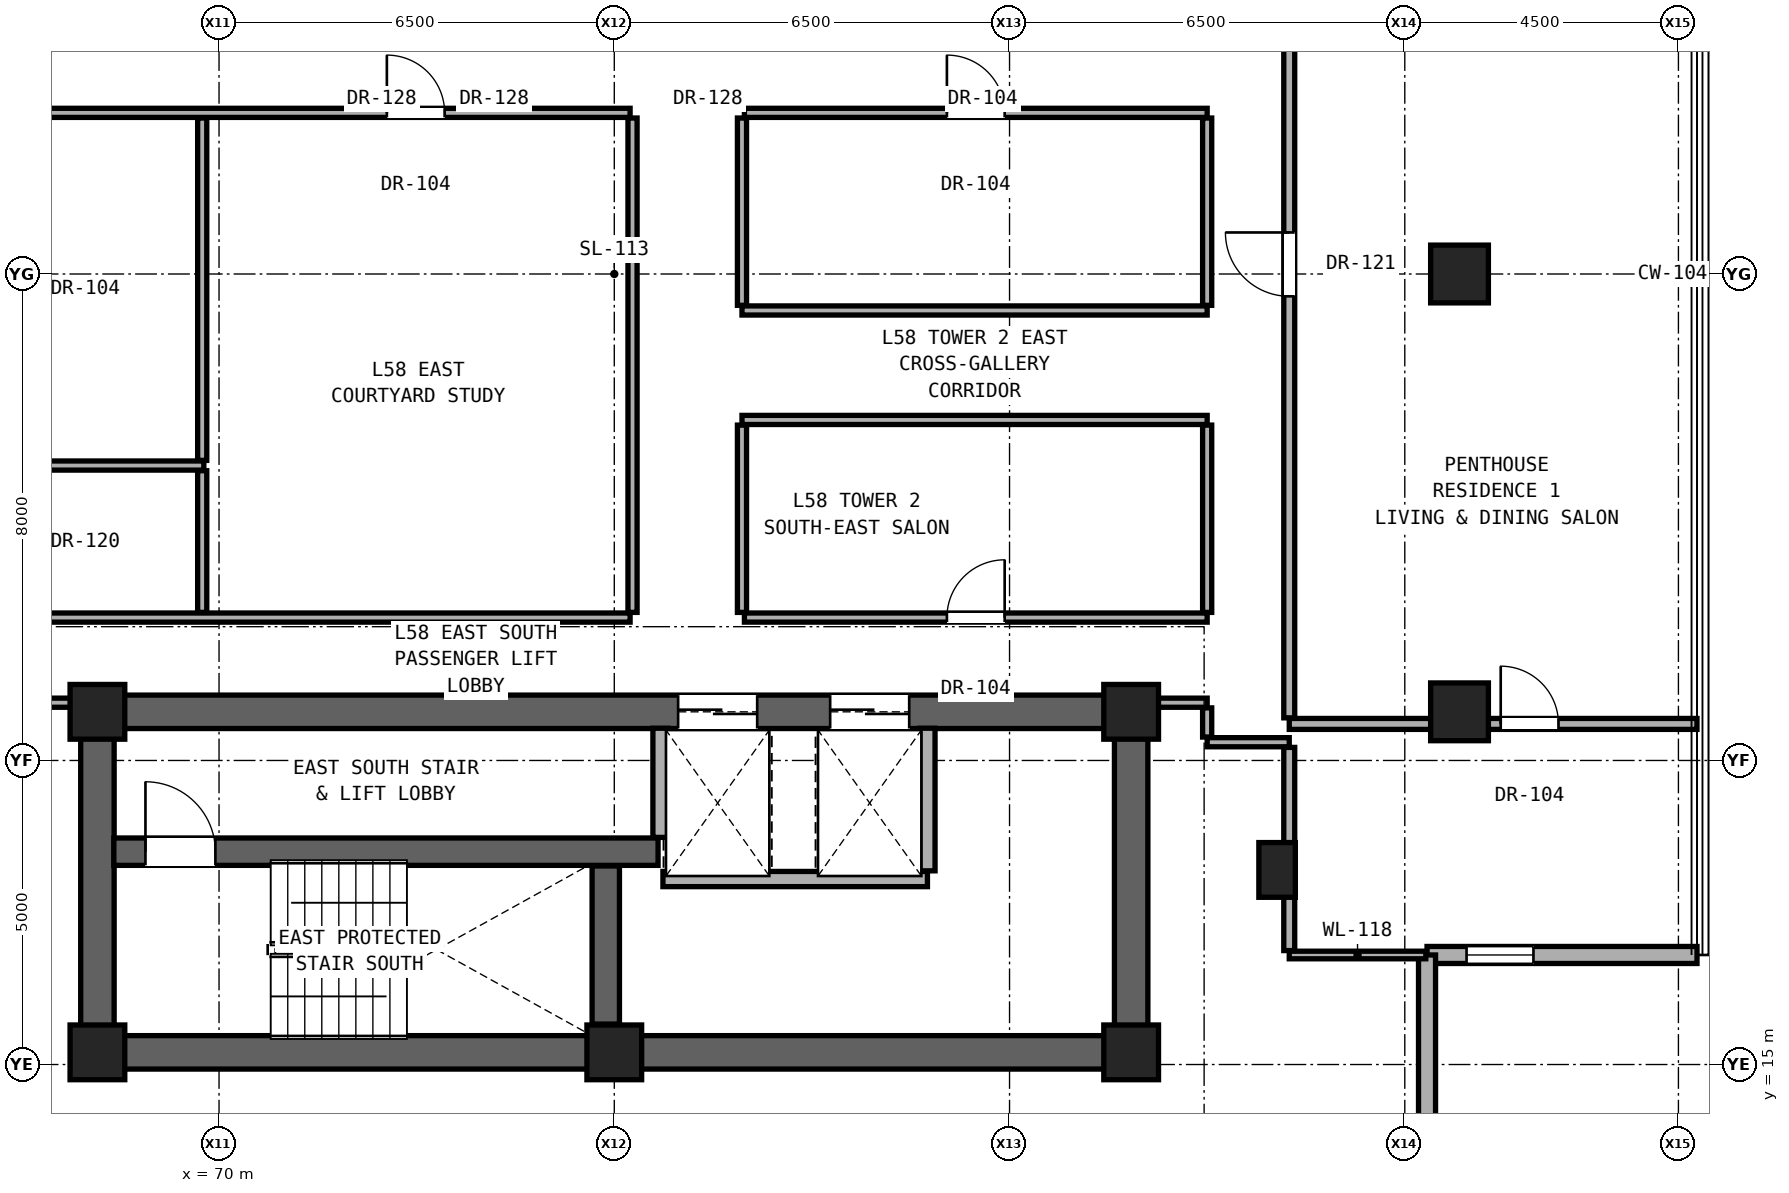
"""IFC4 building model, lengths in metres.
Left out: names, types, materials, properties, quantities, classifications, styles, units other than length and angle.
Written with IfcOpenShell. Run it as: python <this file> out.ifc"""

import sys

from ifc_helpers import new_model, si_unit, direction, frame, frame_2d, origin, origin_2d, place, context, subcontext, project, spatial, rectangle, hollow_rectangle, extrude, element, fill, save


model = new_model("IFC4")
c1 = context("Model", 3, precision=1e-05, world=origin(), true_north=direction((0.0, 1.0)))
c2 = subcontext(c1, "Body", "Model", "MODEL_VIEW")
j1 = project(units=[si_unit("LENGTHUNIT", "METRE"), si_unit("PLANEANGLEUNIT", "RADIAN")], contexts=[c1])
p1 = place(None, origin())
s1 = spatial("IfcSite", under=j1, at=p1, CompositionType="ELEMENT")
p2 = place(p1, origin())
s2 = spatial("IfcBuilding", under=s1, at=p2, CompositionType="ELEMENT")
p3 = place(p2, frame((0.0, 0.0, 203.15)))
s3 = spatial("IfcBuildingStorey", under=s2, at=p3, CompositionType="ELEMENT", Elevation=203.15)
for number, where, z_axis, x_axis in (
    (1, (68.0, 15.2, 0.0), (0.0, 0.0, 1.0), (1.0, 0.0, 0.0)),
    (2, (76.5, 15.2, 0.0), (0.0, 0.0, 1.0), (1.0, 0.0, 0.0)),
    (3, (85.0, 15.2, 0.0), (0.0, 0.0, 1.0), (1.0, 0.0, 0.0)),
    (4, (68.0, 20.8, 0.0), (0.0, 0.0, 1.0), (1.0, 0.0, 0.0)),
    (5, (85.0, 20.8, 0.0), (0.0, 0.0, 1.0), (1.0, 0.0, 0.0)),
):
    element("IfcColumn", number, at=place(p3, frame(where, z_axis=z_axis, x_axis=x_axis)), inside=s3, PredefinedType="COLUMN", context=c2, shape_type="SweptSolid", body=[
        extrude(rectangle(XDim=0.9, YDim=0.9, at=origin_2d()), origin(), (0.0, 0.0, 1.0), 3.25),
    ])
for number, where, z_axis, x_axis in (
    (6, (90.4, 20.8, 0.0), (0.0, 0.0, 1.0), (1.0, 0.0, 0.0)),
    (7, (90.4, 28.0, 0.0), (0.0, 0.0, 1.0), (1.0, 0.0, 0.0)),
):
    element("IfcColumn", number, at=place(p3, frame(where, z_axis=z_axis, x_axis=x_axis)), inside=s3, PredefinedType="COLUMN", context=c2, shape_type="SweptSolid", body=[
        extrude(hollow_rectangle(XDim=0.95, YDim=0.95, WallThickness=0.05, at=origin_2d()), origin(), (0.0, 0.0, 1.0), 3.25),
    ])
p4 = place(p3, frame((87.4, 18.2, 0.0), z_axis=(0.0, 0.0, 1.0), x_axis=(1.0, 0.0, 0.0)))
e8 = element("IfcColumn", 8, at=p4, inside=s3, PredefinedType="PILASTER", context=c2, shape_type="SweptSolid", body=[
    extrude(rectangle(XDim=0.6, YDim=0.9, at=origin_2d()), origin(), (0.0, 0.0, 1.0), 3.25),
])
p5 = place(p3, frame((68.0, 15.2, 0.0), z_axis=(0.0, 0.0, 1.0), x_axis=(1.0, 0.0, 0.0)))
e9 = element("IfcWall", 9, at=p5, inside=s3, PredefinedType="SHEAR", context=c2, shape_type="SweptSolid", body=[
    extrude(rectangle(XDim=17.0, YDim=0.55, at=frame_2d((8.5, 0.0))), origin(), (0.0, 0.0, 1.0), 3.05),
])
for number, where, z_axis, x_axis in (
    (10, (68.0, 15.2, 0.0), (0.0, 0.0, 1.0), (0.0, 1.0, 0.0)),
    (11, (85.0, 15.2, 0.0), (0.0, 0.0, 1.0), (0.0, 1.0, 0.0)),
):
    element("IfcWall", number, at=place(p3, frame(where, z_axis=z_axis, x_axis=x_axis)), inside=s3, PredefinedType="SHEAR", context=c2, shape_type="SweptSolid", body=[
        extrude(rectangle(XDim=5.6, YDim=0.55, at=frame_2d((2.8, 0.0))), origin(), (0.0, 0.0, 1.0), 3.05),
    ])
p6 = place(p3, frame((68.0, 20.8, 0.0), z_axis=(0.0, 0.0, 1.0), x_axis=(1.0, 0.0, 0.0)))
e12 = element("IfcWall", 12, at=p6, inside=s3, PredefinedType="SHEAR", context=c2, shape_type="SweptSolid", body=[
    extrude(rectangle(XDim=17.0, YDim=0.55, at=frame_2d((8.5, 0.0))), origin(), (0.0, 0.0, 1.0), 3.05),
])
p7 = place(p6, frame((9.55, 0.0, 0.0)))
e13 = element("IfcOpeningElement", 13, at=p7, cuts=e12, PredefinedType="OPENING", context=c2, shape_type="SweptSolid", body=[
    extrude(rectangle(XDim=1.3, YDim=2.3, at=frame_2d((0.65, 1.15))), frame((0.0, 0.285, 0.0), z_axis=(0.0, -1.0, 0.0), x_axis=(1.0, 0.0, 0.0)), (0.0, 0.0, 1.0), 0.57),
])
p8 = place(p6, frame((12.05, 0.0, 0.0)))
e14 = element("IfcOpeningElement", 14, at=p8, cuts=e12, PredefinedType="OPENING", context=c2, shape_type="SweptSolid", body=[
    extrude(rectangle(XDim=1.3, YDim=2.3, at=frame_2d((0.65, 1.15))), frame((0.0, 0.285, 0.0), z_axis=(0.0, -1.0, 0.0), x_axis=(1.0, 0.0, 0.0)), (0.0, 0.0, 1.0), 0.57),
])
p9 = place(p3, frame((89.866, 16.802, 0.0), z_axis=(0.0, 0.0, 1.0), x_axis=(1.0, 0.0, 0.0)))
e15 = element("IfcWall", 15, at=p9, inside=s3, PredefinedType="SOLIDWALL", context=c2, shape_type="SweptSolid", body=[
    extrude(rectangle(XDim=4.44, YDim=0.28, at=frame_2d((2.22, 0.0))), origin(), (0.0, 0.0, 1.0), 3.03),
])
p10 = place(p9, frame((0.65, 0.0, 0.85)))
e16 = element("IfcOpeningElement", 16, at=p10, cuts=e15, PredefinedType="OPENING", context=c2, shape_type="SweptSolid", body=[
    extrude(rectangle(XDim=1.1, YDim=2.0, at=frame_2d((0.55, 1.0))), frame((0.0, 0.15, 0.0), z_axis=(0.0, -1.0, 0.0), x_axis=(1.0, 0.0, 0.0)), (0.0, 0.0, 1.0), 0.3),
])
p11 = place(p3, frame((89.866, 12.362, 0.0), z_axis=(0.0, 0.0, 1.0), x_axis=(0.0, 1.0, 0.0)))
e17 = element("IfcWall", 17, at=p11, inside=s3, PredefinedType="SOLIDWALL", context=c2, shape_type="SweptSolid", body=[
    extrude(rectangle(XDim=4.44, YDim=0.28, at=frame_2d((2.22, 0.0))), origin(), (0.0, 0.0, 1.0), 3.03),
])
p12 = place(p3, frame((87.6, 16.801, 0.0), z_axis=(0.0, 0.0, 1.0), x_axis=(1.0, 0.0, 0.0)))
e18 = element("IfcWall", 18, at=p12, inside=s3, PredefinedType="PARTITIONING", context=c2, shape_type="SweptSolid", body=[
    extrude(rectangle(XDim=2.246, YDim=0.125, at=frame_2d((1.123, 0.0))), origin(), (0.0, 0.0, 1.0), 3.05),
])
p13 = place(p3, frame((77.3, 18.05, 0.0), z_axis=(0.0, 0.0, 1.0), x_axis=(1.0, 0.0, 0.0)))
e19 = element("IfcWall", 19, at=p13, inside=s3, PredefinedType="SOLIDWALL", context=c2, shape_type="SweptSolid", body=[
    extrude(rectangle(XDim=4.35, YDim=0.25, at=frame_2d((2.175, 0.0))), origin(), (0.0, 0.0, 1.0), 3.05),
])
p14 = place(p3, frame((68.27, 18.5, 0.0), z_axis=(0.0, 0.0, 1.0), x_axis=(1.0, 0.0, 0.0)))
e20 = element("IfcWall", 20, at=p14, inside=s3, PredefinedType="SHEAR", context=c2, shape_type="SweptSolid", body=[
    extrude(rectangle(XDim=8.95, YDim=0.45, at=frame_2d((4.475, 0.0))), origin(), (0.0, 0.0, 1.0), 3.05),
])
p15 = place(p14, frame((0.52, 0.0, 0.0)))
e21 = element("IfcOpeningElement", 21, at=p15, cuts=e20, PredefinedType="OPENING", context=c2, shape_type="SweptSolid", body=[
    extrude(rectangle(XDim=1.15, YDim=2.2, at=frame_2d((0.575, 1.1))), frame((0.0, 0.235, 0.0), z_axis=(0.0, -1.0, 0.0), x_axis=(1.0, 0.0, 0.0)), (0.0, 0.0, 1.0), 0.47),
])
p16 = place(p3, frame((86.25, 20.3, 0.0), z_axis=(0.0, 0.0, 1.0), x_axis=(1.0, 0.0, 0.0)))
e22 = element("IfcWall", 22, at=p16, inside=s3, PredefinedType="PARTITIONING", context=c2, shape_type="SweptSolid", body=[
    extrude(rectangle(XDim=1.35, YDim=0.15, at=frame_2d((0.675, 0.0))), origin(), (0.0, 0.0, 1.0), 3.05),
])
p17 = place(p3, frame((87.6, 20.601, 0.0), z_axis=(0.0, 0.0, 1.0), x_axis=(1.0, 0.0, 0.0)))
e23 = element("IfcWall", 23, at=p17, inside=s3, PredefinedType="PARTITIONING", context=c2, shape_type="SweptSolid", body=[
    extrude(rectangle(XDim=6.705, YDim=0.18, at=frame_2d((3.353, 0.0))), origin(), (0.0, 0.0, 1.0), 2.442),
])
p18 = place(p17, frame((3.478, 0.0, 0.0)))
e24 = element("IfcOpeningElement", 24, at=p18, cuts=e23, PredefinedType="OPENING", context=c2, shape_type="SweptSolid", body=[
    extrude(rectangle(XDim=0.95, YDim=2.15, at=frame_2d((0.475, 1.075))), frame((0.0, 0.1, 0.0), z_axis=(0.0, -1.0, 0.0), x_axis=(1.0, 0.0, 0.0)), (0.0, 0.0, 1.0), 0.2),
])
p19 = place(p3, frame((66.62, 20.95, 0.0), z_axis=(0.0, 0.0, 1.0), x_axis=(1.0, 0.0, 0.0)))
e25 = element("IfcWall", 25, at=p19, inside=s3, PredefinedType="PARTITIONING", context=c2, shape_type="SweptSolid", body=[
    extrude(rectangle(XDim=1.11, YDim=0.15, at=frame_2d((0.555, 0.0))), origin(), (0.0, 0.0, 1.0), 2.442),
])
p20 = place(p3, frame((85.27, 20.95, 0.0), z_axis=(0.0, 0.0, 1.0), x_axis=(1.0, 0.0, 0.0)))
e26 = element("IfcWall", 26, at=p20, inside=s3, PredefinedType="PARTITIONING", context=c2, shape_type="SweptSolid", body=[
    extrude(rectangle(XDim=0.98, YDim=0.15, at=frame_2d((0.49, 0.0))), origin(), (0.0, 0.0, 1.0), 2.442),
])
p21 = place(p3, frame((66.62, 22.35, 0.0), z_axis=(0.0, 0.0, 1.0), x_axis=(1.0, 0.0, 0.0)))
e27 = element("IfcWall", 27, at=p21, inside=s3, PredefinedType="PARTITIONING", context=c2, shape_type="SweptSolid", body=[
    extrude(rectangle(XDim=10.14, YDim=0.15, at=frame_2d((5.07, 0.0))), origin(), (0.0, 0.0, 1.0), 2.186),
])
p22 = place(p3, frame((78.64, 22.35, 0.0), z_axis=(0.0, 0.0, 1.0), x_axis=(1.0, 0.0, 0.0)))
e28 = element("IfcWall", 28, at=p22, inside=s3, PredefinedType="PARTITIONING", context=c2, shape_type="SweptSolid", body=[
    extrude(rectangle(XDim=7.61, YDim=0.15, at=frame_2d((3.805, 0.0))), origin(), (0.0, 0.0, 1.0), 2.186),
])
p23 = place(p22, frame((3.33, 0.0, 0.0)))
e29 = element("IfcOpeningElement", 29, at=p23, cuts=e28, PredefinedType="OPENING", context=c2, shape_type="SweptSolid", body=[
    extrude(rectangle(XDim=0.95, YDim=2.15, at=frame_2d((0.475, 1.075))), frame((0.0, 0.085, 0.0), z_axis=(0.0, -1.0, 0.0), x_axis=(1.0, 0.0, 0.0)), (0.0, 0.0, 1.0), 0.17),
])
p24 = place(p3, frame((66.62, 24.85, 0.0), z_axis=(0.0, 0.0, 1.0), x_axis=(1.0, 0.0, 0.0)))
e30 = element("IfcWall", 30, at=p24, inside=s3, PredefinedType="PARTITIONING", context=c2, shape_type="SweptSolid", body=[
    extrude(rectangle(XDim=3.13, YDim=0.15, at=frame_2d((1.565, 0.0))), origin(), (0.0, 0.0, 1.0), 2.186),
])
for number, where, z_axis, x_axis in (
    (31, (78.6, 25.6, 0.0), (0.0, 0.0, 1.0), (1.0, 0.0, 0.0)),
    (32, (78.6, 27.4, 0.0), (0.0, 0.0, 1.0), (1.0, 0.0, 0.0)),
):
    element("IfcWall", number, at=place(p3, frame(where, z_axis=z_axis, x_axis=x_axis)), inside=s3, PredefinedType="PARTITIONING", context=c2, shape_type="SweptSolid", body=[
        extrude(rectangle(XDim=7.65, YDim=0.15, at=frame_2d((3.825, 0.0))), origin(), (0.0, 0.0, 1.0), 2.186),
    ])
p25 = place(p3, frame((66.62, 30.65, 0.0), z_axis=(0.0, 0.0, 1.0), x_axis=(1.0, 0.0, 0.0)))
e33 = element("IfcWall", 33, at=p25, inside=s3, PredefinedType="PARTITIONING", context=c2, shape_type="SweptSolid", body=[
    extrude(rectangle(XDim=10.14, YDim=0.15, at=frame_2d((5.07, 0.0))), origin(), (0.0, 0.0, 1.0), 2.186),
])
p26 = place(p25, frame((6.14, 0.0, 0.0)))
e34 = element("IfcOpeningElement", 34, at=p26, cuts=e33, PredefinedType="OPENING", context=c2, shape_type="SweptSolid", body=[
    extrude(rectangle(XDim=0.95, YDim=2.15, at=frame_2d((0.475, 1.075))), frame((0.0, 0.085, 0.0), z_axis=(0.0, -1.0, 0.0), x_axis=(1.0, 0.0, 0.0)), (0.0, 0.0, 1.0), 0.17),
])
p27 = place(p3, frame((78.64, 30.65, 0.0), z_axis=(0.0, 0.0, 1.0), x_axis=(1.0, 0.0, 0.0)))
e35 = element("IfcWall", 35, at=p27, inside=s3, PredefinedType="PARTITIONING", context=c2, shape_type="SweptSolid", body=[
    extrude(rectangle(XDim=7.61, YDim=0.15, at=frame_2d((3.805, 0.0))), origin(), (0.0, 0.0, 1.0), 2.186),
])
p28 = place(p27, frame((3.33, 0.0, 0.0)))
e36 = element("IfcOpeningElement", 36, at=p28, cuts=e35, PredefinedType="OPENING", context=c2, shape_type="SweptSolid", body=[
    extrude(rectangle(XDim=0.95, YDim=2.15, at=frame_2d((0.475, 1.075))), frame((0.0, 0.085, 0.0), z_axis=(0.0, -1.0, 0.0), x_axis=(1.0, 0.0, 0.0)), (0.0, 0.0, 1.0), 0.17),
])
p29 = place(p3, frame((69.723, 22.435, 0.0), z_axis=(0.0, 0.0, 1.0), x_axis=(0.0, 1.0, 0.0)))
e37 = element("IfcWall", 37, at=p29, inside=s3, PredefinedType="PARTITIONING", context=c2, shape_type="SweptSolid", body=[
    extrude(rectangle(XDim=2.33, YDim=0.15, at=frame_2d((1.165, 0.0))), origin(), (0.0, 0.0, 1.0), 3.05),
])
p30 = place(p3, frame((69.723, 24.935, 0.0), z_axis=(0.0, 0.0, 1.0), x_axis=(0.0, 1.0, 0.0)))
e38 = element("IfcWall", 38, at=p30, inside=s3, PredefinedType="PARTITIONING", context=c2, shape_type="SweptSolid", body=[
    extrude(rectangle(XDim=5.63, YDim=0.15, at=frame_2d((2.815, 0.0))), origin(), (0.0, 0.0, 1.0), 2.186),
])
p31 = place(p3, frame((76.36, 15.665, 0.0), z_axis=(0.0, 0.0, 1.0), x_axis=(0.0, 1.0, 0.0)))
e39 = element("IfcWall", 39, at=p31, inside=s3, PredefinedType="SHEAR", context=c2, shape_type="SweptSolid", body=[
    extrude(rectangle(XDim=2.6, YDim=0.45, at=frame_2d((1.3, 0.0))), origin(), (0.0, 0.0, 1.0), 3.05),
])
p32 = place(p3, frame((76.8, 22.435, 0.0), z_axis=(0.0, 0.0, 1.0), x_axis=(0.0, 1.0, 0.0)))
e40 = element("IfcWall", 40, at=p32, inside=s3, PredefinedType="PARTITIONING", context=c2, shape_type="SweptSolid", body=[
    extrude(rectangle(XDim=8.13, YDim=0.15, at=frame_2d((4.065, 0.0))), origin(), (0.0, 0.0, 1.0), 2.186),
])
p33 = place(p3, frame((77.26, 18.735, 0.0), z_axis=(0.0, 0.0, 1.0), x_axis=(0.0, 1.0, 0.0)))
e41 = element("IfcWall", 41, at=p33, inside=s3, PredefinedType="SOLIDWALL", context=c2, shape_type="SweptSolid", body=[
    extrude(rectangle(XDim=1.795, YDim=0.25, at=frame_2d((0.897, 0.0))), origin(), (0.0, 0.0, 1.0), 3.05),
])
p34 = place(p3, frame((78.6, 22.435, 0.0), z_axis=(0.0, 0.0, 1.0), x_axis=(0.0, 1.0, 0.0)))
e42 = element("IfcWall", 42, at=p34, inside=s3, PredefinedType="PARTITIONING", context=c2, shape_type="SweptSolid", body=[
    extrude(rectangle(XDim=3.08, YDim=0.15, at=frame_2d((1.54, 0.0))), origin(), (0.0, 0.0, 1.0), 3.05),
])
p35 = place(p3, frame((78.6, 27.485, 0.0), z_axis=(0.0, 0.0, 1.0), x_axis=(0.0, 1.0, 0.0)))
e43 = element("IfcWall", 43, at=p35, inside=s3, PredefinedType="PARTITIONING", context=c2, shape_type="SweptSolid", body=[
    extrude(rectangle(XDim=3.08, YDim=0.15, at=frame_2d((1.54, 0.0))), origin(), (0.0, 0.0, 1.0), 2.186),
])
p36 = place(p3, frame((81.65, 18.185, 0.0), z_axis=(0.0, 0.0, 1.0), x_axis=(0.0, 1.0, 0.0)))
e44 = element("IfcWall", 44, at=p36, inside=s3, PredefinedType="SOLIDWALL", context=c2, shape_type="SweptSolid", body=[
    extrude(rectangle(XDim=2.345, YDim=0.25, at=frame_2d((1.172, 0.0))), origin(), (0.0, 0.0, 1.0), 3.05),
])
p37 = place(p3, frame((86.25, 20.385, 0.0), z_axis=(0.0, 0.0, 1.0), x_axis=(0.0, 1.0, 0.0)))
e45 = element("IfcWall", 45, at=p37, inside=s3, PredefinedType="PARTITIONING", context=c2, shape_type="SweptSolid", body=[
    extrude(rectangle(XDim=0.48, YDim=0.15, at=frame_2d((0.24, 0.0))), origin(), (0.0, 0.0, 1.0), 2.442),
])
p38 = place(p3, frame((86.25, 22.435, 0.0), z_axis=(0.0, 0.0, 1.0), x_axis=(0.0, 1.0, 0.0)))
e46 = element("IfcWall", 46, at=p38, inside=s3, PredefinedType="PARTITIONING", context=c2, shape_type="SweptSolid", body=[
    extrude(rectangle(XDim=3.08, YDim=0.15, at=frame_2d((1.54, 0.0))), origin(), (0.0, 0.0, 1.0), 3.05),
])
p39 = place(p3, frame((86.25, 27.485, 0.0), z_axis=(0.0, 0.0, 1.0), x_axis=(0.0, 1.0, 0.0)))
e47 = element("IfcWall", 47, at=p39, inside=s3, PredefinedType="PARTITIONING", context=c2, shape_type="SweptSolid", body=[
    extrude(rectangle(XDim=3.08, YDim=0.15, at=frame_2d((1.54, 0.0))), origin(), (0.0, 0.0, 1.0), 2.346),
])
p40 = place(p3, frame((87.6, 16.874, 0.0), z_axis=(0.0, 0.0, 1.0), x_axis=(0.0, 1.0, 0.0)))
e48 = element("IfcWall", 48, at=p40, inside=s3, PredefinedType="PARTITIONING", context=c2, shape_type="SweptSolid", body=[
    extrude(rectangle(XDim=3.342, YDim=0.18, at=frame_2d((1.671, 0.0))), origin(), (0.0, 0.0, 1.0), 2.493),
])
p41 = place(p3, frame((87.6, 20.701, 0.0), z_axis=(0.0, 0.0, 1.0), x_axis=(0.0, 1.0, 0.0)))
e49 = element("IfcWall", 49, at=p41, inside=s3, PredefinedType="PARTITIONING", context=c2, shape_type="SweptSolid", body=[
    extrude(rectangle(XDim=14.914, YDim=0.18, at=frame_2d((7.457, 0.0))), origin(), (0.0, 0.0, 1.0), 2.346),
])
p42 = place(p41, frame((6.932, 0.0, 0.0)))
e50 = element("IfcOpeningElement", 50, at=p42, cuts=e49, PredefinedType="OPENING", context=c2, shape_type="SweptSolid", body=[
    extrude(rectangle(XDim=1.05, YDim=2.2, at=frame_2d((0.525, 1.1))), frame((0.0, 0.1, 0.0), z_axis=(0.0, -1.0, 0.0), x_axis=(1.0, 0.0, 0.0)), (0.0, 0.0, 1.0), 0.2),
])
p43 = place(p10, origin())
e51 = element("IfcWindow", 51, at=p43, inside=s3, PartitioningType="SINGLE_PANEL", PredefinedType="WINDOW", context=c2, shape_type="SweptSolid", body=[
    extrude(rectangle(XDim=1.1, YDim=2.0, at=frame_2d((0.55, 1.0))), frame((0.0, 0.03, 0.0), z_axis=(0.0, -1.0, 0.0), x_axis=(1.0, 0.0, 0.0)), (0.0, 0.0, 1.0), 0.06),
])
fill(e16, e51)
p44 = place(p15, origin())
e52 = element("IfcDoor", 52, at=p44, inside=s3, OperationType="SINGLE_SWING_LEFT", PredefinedType="DOOR", context=c2, shape_type="SweptSolid", body=[
    extrude(rectangle(XDim=1.15, YDim=2.2, at=frame_2d((0.575, 1.1))), frame((0.0, 0.025, 0.0), z_axis=(0.0, -1.0, 0.0), x_axis=(1.0, 0.0, 0.0)), (0.0, 0.0, 1.0), 0.05),
])
fill(e21, e52)
p45 = place(p42, origin())
e53 = element("IfcDoor", 53, at=p45, inside=s3, OperationType="SINGLE_SWING_RIGHT", PredefinedType="DOOR", context=c2, shape_type="SweptSolid", body=[
    extrude(rectangle(XDim=1.05, YDim=2.2, at=frame_2d((0.525, 1.1))), frame((0.0, 0.025, 0.0), z_axis=(0.0, -1.0, 0.0), x_axis=(1.0, 0.0, 0.0)), (0.0, 0.0, 1.0), 0.05),
])
fill(e50, e53)
p46 = place(p18, origin())
e54 = element("IfcDoor", 54, at=p46, inside=s3, OperationType="SINGLE_SWING_LEFT", PredefinedType="DOOR", context=c2, shape_type="SweptSolid", body=[
    extrude(rectangle(XDim=0.95, YDim=2.15, at=frame_2d((0.475, 1.075))), frame((0.0, 0.025, 0.0), z_axis=(0.0, -1.0, 0.0), x_axis=(1.0, 0.0, 0.0)), (0.0, 0.0, 1.0), 0.05),
])
fill(e24, e54)
p47 = place(p26, origin())
e55 = element("IfcDoor", 55, at=p47, inside=s3, OperationType="SINGLE_SWING_LEFT", PredefinedType="DOOR", context=c2, shape_type="SweptSolid", body=[
    extrude(rectangle(XDim=0.95, YDim=2.15, at=frame_2d((0.475, 1.075))), frame((0.0, 0.025, 0.0), z_axis=(0.0, -1.0, 0.0), x_axis=(1.0, 0.0, 0.0)), (0.0, 0.0, 1.0), 0.05),
])
fill(e34, e55)
p48 = place(p23, origin())
e56 = element("IfcDoor", 56, at=p48, inside=s3, OperationType="SINGLE_SWING_RIGHT", PredefinedType="DOOR", context=c2, shape_type="SweptSolid", body=[
    extrude(rectangle(XDim=0.95, YDim=2.15, at=frame_2d((0.475, 1.075))), frame((0.0, 0.025, 0.0), z_axis=(0.0, -1.0, 0.0), x_axis=(1.0, 0.0, 0.0)), (0.0, 0.0, 1.0), 0.05),
])
fill(e29, e56)
p49 = place(p28, origin())
e57 = element("IfcDoor", 57, at=p49, inside=s3, OperationType="SINGLE_SWING_LEFT", PredefinedType="DOOR", context=c2, shape_type="SweptSolid", body=[
    extrude(rectangle(XDim=0.95, YDim=2.15, at=frame_2d((0.475, 1.075))), frame((0.0, 0.025, 0.0), z_axis=(0.0, -1.0, 0.0), x_axis=(1.0, 0.0, 0.0)), (0.0, 0.0, 1.0), 0.05),
])
fill(e36, e57)
p50 = place(p7, origin())
e58 = element("IfcDoor", 58, at=p50, inside=s3, OperationType="DOUBLE_DOOR_SLIDING", PredefinedType="DOOR", context=c2, shape_type="SweptSolid", body=[
    extrude(rectangle(XDim=1.3, YDim=2.3, at=frame_2d((0.65, 1.15))), frame((0.0, 0.025, 0.0), z_axis=(0.0, -1.0, 0.0), x_axis=(1.0, 0.0, 0.0)), (0.0, 0.0, 1.0), 0.05),
])
fill(e13, e58)
p51 = place(p8, origin())
e59 = element("IfcDoor", 59, at=p51, inside=s3, OperationType="DOUBLE_DOOR_SLIDING", PredefinedType="DOOR", context=c2, shape_type="SweptSolid", body=[
    extrude(rectangle(XDim=1.3, YDim=2.3, at=frame_2d((0.65, 1.15))), frame((0.0, 0.025, 0.0), z_axis=(0.0, -1.0, 0.0), x_axis=(1.0, 0.0, 0.0)), (0.0, 0.0, 1.0), 0.05),
])
fill(e14, e59)
save(model, sys.argv[1])
